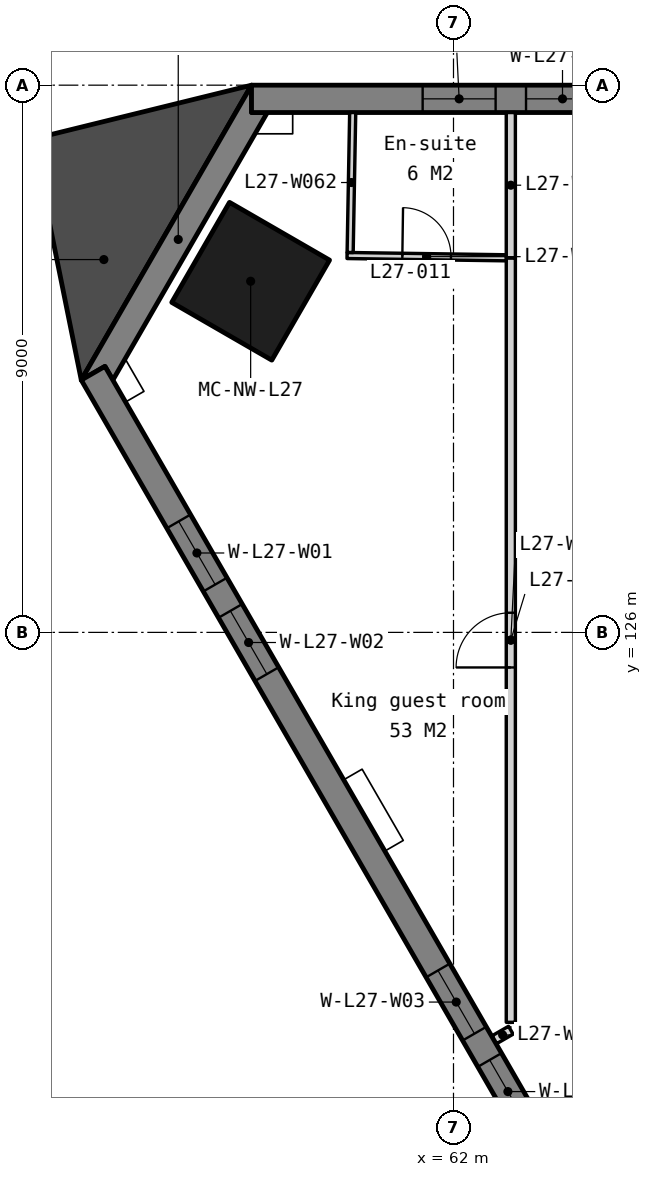
"""IFC4 building model, lengths in metres.
Left out: names, types, materials, properties, quantities, classifications, styles, units other than length and angle.
Written with IfcOpenShell. Run it as: python <this file> out.ifc"""

import sys

from ifc_helpers import new_model, si_unit, direction, frame, frame_2d, origin, origin_2d, place, context, subcontext, project, spatial, polyline, rectangle, outline, extrude, element, fill, save


model = new_model("IFC4")
c1 = context("Model", 3, precision=1e-05, world=origin(), true_north=direction((0.0, 1.0)))
c2 = subcontext(c1, "Body", "Model", "MODEL_VIEW")
j1 = project(units=[si_unit("LENGTHUNIT", "METRE"), si_unit("PLANEANGLEUNIT", "RADIAN")], contexts=[c1])
p1 = place(None, origin())
s1 = spatial("IfcSite", under=j1, at=p1, CompositionType="ELEMENT")
p2 = place(p1, origin())
s2 = spatial("IfcBuilding", under=s1, at=p2, CompositionType="ELEMENT")
p3 = place(p2, frame((0.0, 0.0, 109.8)))
s3 = spatial("IfcBuildingStorey", under=s2, at=p3, CompositionType="ELEMENT", Elevation=109.8)
p4 = place(p3, frame((58.664, 131.775, 0.0), z_axis=(0.0, 0.0, 1.0), x_axis=(-0.5, -0.866025403784, 0.0)))
e1 = element("IfcColumn", 1, at=p4, inside=s3, PredefinedType="COLUMN", context=c2, shape_type="SweptSolid", body=[
    extrude(rectangle(XDim=1.9, YDim=1.9, at=origin_2d()), origin(), (0.0, 0.0, 1.0), 3.5),
])
p5 = place(p3, frame((0.0, 0.0, -0.15)))
e2 = element("IfcWall", 2, at=p5, inside=s3, PredefinedType="SOLIDWALL", context=c2, shape_type="SweptSolid", body=[
    extrude(outline(polyline([(58.678, 135.0), (58.678, 134.55), (58.938, 134.55), (56.398, 130.15), (56.268, 130.375), (55.878, 130.15), (58.678, 135.0)])), origin(), (0.0, 0.0, 1.0), 3.5),
])
p6 = place(p3, frame((101.322, 134.775, -0.15), z_axis=(0.0, 0.0, 1.0), x_axis=(-1.0, 0.0, 0.0)))
e3 = element("IfcWall", 3, at=p6, inside=s3, PredefinedType="SOLIDWALL", context=c2, shape_type="SweptSolid", body=[
    extrude(outline(polyline([(42.643, 0.0), (42.643, 3.5), (0.0, 3.5), (0.0, 0.0), (42.643, 0.0)])), frame((0.0, 0.225, 0.0), z_axis=(0.0, -1.0, 0.0), x_axis=(1.0, 0.0, 0.0)), (0.0, 0.0, 1.0), 0.45),
])
p7 = place(p6, frame((2.814, 0.0, 1.05)))
e4 = element("IfcOpeningElement", 4, at=p7, cuts=e3, PredefinedType="OPENING", context=c2, shape_type="SweptSolid", body=[
    extrude(rectangle(XDim=1.2, YDim=1.5, at=frame_2d((0.6, 0.75))), frame((0.0, 0.235, 0.0), z_axis=(0.0, -1.0, 0.0), x_axis=(1.0, 0.0, 0.0)), (0.0, 0.0, 1.0), 0.47),
])
p8 = place(p6, frame((4.514, 0.0, 1.05)))
e5 = element("IfcOpeningElement", 5, at=p8, cuts=e3, PredefinedType="OPENING", context=c2, shape_type="SweptSolid", body=[
    extrude(rectangle(XDim=1.2, YDim=1.5, at=frame_2d((0.6, 0.75))), frame((0.0, 0.235, 0.0), z_axis=(0.0, -1.0, 0.0), x_axis=(1.0, 0.0, 0.0)), (0.0, 0.0, 1.0), 0.47),
])
p9 = place(p6, frame((11.343, 0.0, 1.05)))
e6 = element("IfcOpeningElement", 6, at=p9, cuts=e3, PredefinedType="OPENING", context=c2, shape_type="SweptSolid", body=[
    extrude(rectangle(XDim=1.2, YDim=1.5, at=frame_2d((0.6, 0.75))), frame((0.0, 0.235, 0.0), z_axis=(0.0, -1.0, 0.0), x_axis=(1.0, 0.0, 0.0)), (0.0, 0.0, 1.0), 0.47),
])
p10 = place(p6, frame((13.043, 0.0, 1.05)))
e7 = element("IfcOpeningElement", 7, at=p10, cuts=e3, PredefinedType="OPENING", context=c2, shape_type="SweptSolid", body=[
    extrude(rectangle(XDim=1.2, YDim=1.5, at=frame_2d((0.6, 0.75))), frame((0.0, 0.235, 0.0), z_axis=(0.0, -1.0, 0.0), x_axis=(1.0, 0.0, 0.0)), (0.0, 0.0, 1.0), 0.47),
])
p11 = place(p6, frame((19.872, 0.0, 1.05)))
e8 = element("IfcOpeningElement", 8, at=p11, cuts=e3, PredefinedType="OPENING", context=c2, shape_type="SweptSolid", body=[
    extrude(rectangle(XDim=1.2, YDim=1.5, at=frame_2d((0.6, 0.75))), frame((0.0, 0.235, 0.0), z_axis=(0.0, -1.0, 0.0), x_axis=(1.0, 0.0, 0.0)), (0.0, 0.0, 1.0), 0.47),
])
p12 = place(p6, frame((21.572, 0.0, 1.05)))
e9 = element("IfcOpeningElement", 9, at=p12, cuts=e3, PredefinedType="OPENING", context=c2, shape_type="SweptSolid", body=[
    extrude(rectangle(XDim=1.2, YDim=1.5, at=frame_2d((0.6, 0.75))), frame((0.0, 0.235, 0.0), z_axis=(0.0, -1.0, 0.0), x_axis=(1.0, 0.0, 0.0)), (0.0, 0.0, 1.0), 0.47),
])
p13 = place(p6, frame((28.4, 0.0, 1.05)))
e10 = element("IfcOpeningElement", 10, at=p13, cuts=e3, PredefinedType="OPENING", context=c2, shape_type="SweptSolid", body=[
    extrude(rectangle(XDim=1.2, YDim=1.5, at=frame_2d((0.6, 0.75))), frame((0.0, 0.235, 0.0), z_axis=(0.0, -1.0, 0.0), x_axis=(1.0, 0.0, 0.0)), (0.0, 0.0, 1.0), 0.47),
])
p14 = place(p6, frame((30.1, 0.0, 1.05)))
e11 = element("IfcOpeningElement", 11, at=p14, cuts=e3, PredefinedType="OPENING", context=c2, shape_type="SweptSolid", body=[
    extrude(rectangle(XDim=1.2, YDim=1.5, at=frame_2d((0.6, 0.75))), frame((0.0, 0.235, 0.0), z_axis=(0.0, -1.0, 0.0), x_axis=(1.0, 0.0, 0.0)), (0.0, 0.0, 1.0), 0.47),
])
p15 = place(p6, frame((36.929, 0.0, 1.05)))
e12 = element("IfcOpeningElement", 12, at=p15, cuts=e3, PredefinedType="OPENING", context=c2, shape_type="SweptSolid", body=[
    extrude(rectangle(XDim=1.2, YDim=1.5, at=frame_2d((0.6, 0.75))), frame((0.0, 0.235, 0.0), z_axis=(0.0, -1.0, 0.0), x_axis=(1.0, 0.0, 0.0)), (0.0, 0.0, 1.0), 0.47),
])
p16 = place(p6, frame((38.629, 0.0, 1.05)))
e13 = element("IfcOpeningElement", 13, at=p16, cuts=e3, PredefinedType="OPENING", context=c2, shape_type="SweptSolid", body=[
    extrude(rectangle(XDim=1.2, YDim=1.5, at=frame_2d((0.6, 0.75))), frame((0.0, 0.235, 0.0), z_axis=(0.0, -1.0, 0.0), x_axis=(1.0, 0.0, 0.0)), (0.0, 0.0, 1.0), 0.47),
])
p17 = place(p3, frame((56.073, 130.263, -0.15), z_axis=(0.0, 0.0, 1.0), x_axis=(0.500000478905, -0.866025127289, 0.0)))
e14 = element("IfcWall", 14, at=p17, inside=s3, PredefinedType="SOLIDWALL", context=c2, shape_type="SweptSolid", body=[
    extrude(outline(polyline([(42.643, 0.0), (42.643, 3.5), (0.0, 3.5), (0.0, 0.0), (42.643, 0.0)])), frame((0.0, 0.225, 0.0), z_axis=(0.0, -1.0, 0.0), x_axis=(1.0, 0.0, 0.0)), (0.0, 0.0, 1.0), 0.45),
])
p18 = place(p17, frame((2.814, 0.0, 1.05)))
e15 = element("IfcOpeningElement", 15, at=p18, cuts=e14, PredefinedType="OPENING", context=c2, shape_type="SweptSolid", body=[
    extrude(rectangle(XDim=1.2, YDim=1.5, at=frame_2d((0.6, 0.75))), frame((0.0, 0.235, 0.0), z_axis=(0.0, -1.0, 0.0), x_axis=(1.0, 0.0, 0.0)), (0.0, 0.0, 1.0), 0.47),
])
p19 = place(p17, frame((4.514, 0.0, 1.05)))
e16 = element("IfcOpeningElement", 16, at=p19, cuts=e14, PredefinedType="OPENING", context=c2, shape_type="SweptSolid", body=[
    extrude(rectangle(XDim=1.2, YDim=1.5, at=frame_2d((0.6, 0.75))), frame((0.0, 0.235, 0.0), z_axis=(0.0, -1.0, 0.0), x_axis=(1.0, 0.0, 0.0)), (0.0, 0.0, 1.0), 0.47),
])
p20 = place(p17, frame((11.343, 0.0, 1.05)))
e17 = element("IfcOpeningElement", 17, at=p20, cuts=e14, PredefinedType="OPENING", context=c2, shape_type="SweptSolid", body=[
    extrude(rectangle(XDim=1.2, YDim=1.5, at=frame_2d((0.6, 0.75))), frame((0.0, 0.235, 0.0), z_axis=(0.0, -1.0, 0.0), x_axis=(1.0, 0.0, 0.0)), (0.0, 0.0, 1.0), 0.47),
])
p21 = place(p17, frame((13.043, 0.0, 1.05)))
e18 = element("IfcOpeningElement", 18, at=p21, cuts=e14, PredefinedType="OPENING", context=c2, shape_type="SweptSolid", body=[
    extrude(rectangle(XDim=1.2, YDim=1.5, at=frame_2d((0.6, 0.75))), frame((0.0, 0.235, 0.0), z_axis=(0.0, -1.0, 0.0), x_axis=(1.0, 0.0, 0.0)), (0.0, 0.0, 1.0), 0.47),
])
p22 = place(p17, frame((19.872, 0.0, 1.05)))
e19 = element("IfcOpeningElement", 19, at=p22, cuts=e14, PredefinedType="OPENING", context=c2, shape_type="SweptSolid", body=[
    extrude(rectangle(XDim=1.2, YDim=1.5, at=frame_2d((0.6, 0.75))), frame((0.0, 0.235, 0.0), z_axis=(0.0, -1.0, 0.0), x_axis=(1.0, 0.0, 0.0)), (0.0, 0.0, 1.0), 0.47),
])
p23 = place(p17, frame((21.572, 0.0, 1.05)))
e20 = element("IfcOpeningElement", 20, at=p23, cuts=e14, PredefinedType="OPENING", context=c2, shape_type="SweptSolid", body=[
    extrude(rectangle(XDim=1.2, YDim=1.5, at=frame_2d((0.6, 0.75))), frame((0.0, 0.235, 0.0), z_axis=(0.0, -1.0, 0.0), x_axis=(1.0, 0.0, 0.0)), (0.0, 0.0, 1.0), 0.47),
])
p24 = place(p17, frame((28.4, 0.0, 1.05)))
e21 = element("IfcOpeningElement", 21, at=p24, cuts=e14, PredefinedType="OPENING", context=c2, shape_type="SweptSolid", body=[
    extrude(rectangle(XDim=1.2, YDim=1.5, at=frame_2d((0.6, 0.75))), frame((0.0, 0.235, 0.0), z_axis=(0.0, -1.0, 0.0), x_axis=(1.0, 0.0, 0.0)), (0.0, 0.0, 1.0), 0.47),
])
p25 = place(p17, frame((30.1, 0.0, 1.05)))
e22 = element("IfcOpeningElement", 22, at=p25, cuts=e14, PredefinedType="OPENING", context=c2, shape_type="SweptSolid", body=[
    extrude(rectangle(XDim=1.2, YDim=1.5, at=frame_2d((0.6, 0.75))), frame((0.0, 0.235, 0.0), z_axis=(0.0, -1.0, 0.0), x_axis=(1.0, 0.0, 0.0)), (0.0, 0.0, 1.0), 0.47),
])
p26 = place(p17, frame((36.929, 0.0, 1.05)))
e23 = element("IfcOpeningElement", 23, at=p26, cuts=e14, PredefinedType="OPENING", context=c2, shape_type="SweptSolid", body=[
    extrude(rectangle(XDim=1.2, YDim=1.5, at=frame_2d((0.6, 0.75))), frame((0.0, 0.235, 0.0), z_axis=(0.0, -1.0, 0.0), x_axis=(1.0, 0.0, 0.0)), (0.0, 0.0, 1.0), 0.47),
])
p27 = place(p17, frame((38.629, 0.0, 1.05)))
e24 = element("IfcOpeningElement", 24, at=p27, cuts=e14, PredefinedType="OPENING", context=c2, shape_type="SweptSolid", body=[
    extrude(rectangle(XDim=1.2, YDim=1.5, at=frame_2d((0.6, 0.75))), frame((0.0, 0.235, 0.0), z_axis=(0.0, -1.0, 0.0), x_axis=(1.0, 0.0, 0.0)), (0.0, 0.0, 1.0), 0.47),
])
p28 = place(p3, frame((0.0, 0.0, -0.15)))
e25 = element("IfcWall", 25, at=p28, inside=s3, PredefinedType="SOLIDWALL", context=c2, shape_type="SweptSolid", body=[
    extrude(outline(polyline([(58.678, 135.0), (55.077, 134.113), (55.878, 130.15), (58.678, 135.0)])), origin(), (0.0, 0.0, 1.0), 3.5),
])
p29 = place(p3, frame((62.673, 119.301, 0.0), z_axis=(0.0, 0.0, 1.0), x_axis=(0.866159461733, 0.499767732902, 0.0)))
e26 = element("IfcWall", 26, at=p29, inside=s3, PredefinedType="PARTITIONING", context=c2, shape_type="SweptSolid", body=[
    extrude(rectangle(XDim=0.311, YDim=0.15, at=frame_2d((0.156, 0.0))), origin(), (0.0, 0.0, 1.0), 3.35),
])
p30 = place(p3, frame((62.943, 119.587, 0.0), z_axis=(0.0, 0.0, 1.0), x_axis=(0.0, 1.0, 0.0)))
e27 = element("IfcWall", 27, at=p30, inside=s3, PredefinedType="PARTITIONING", context=c2, shape_type="SweptSolid", body=[
    extrude(rectangle(XDim=12.573, YDim=0.15, at=frame_2d((6.287, 0.0))), origin(), (0.0, 0.0, 1.0), 3.35),
])
p31 = place(p30, frame((5.836, 0.0, 0.0)))
e28 = element("IfcOpeningElement", 28, at=p31, cuts=e27, PredefinedType="OPENING", context=c2, shape_type="SweptSolid", body=[
    extrude(rectangle(XDim=0.9, YDim=2.1, at=frame_2d((0.45, 1.05))), frame((0.0, 0.085, 0.0), z_axis=(0.0, -1.0, 0.0), x_axis=(1.0, 0.0, 0.0)), (0.0, 0.0, 1.0), 0.17),
])
p32 = place(p3, frame((60.25, 132.198, 0.0), z_axis=(0.0, 0.0, 1.0), x_axis=(0.999895563634, -0.014452052626, 0.0)))
e29 = element("IfcWall", 29, at=p32, inside=s3, PredefinedType="PARTITIONING", context=c2, shape_type="SweptSolid", body=[
    extrude(rectangle(XDim=2.618, YDim=0.1, at=frame_2d((1.309, 0.0))), origin(), (0.0, 0.0, 1.0), 3.35),
])
p33 = place(p32, frame((0.909, 0.0, 0.0)))
e30 = element("IfcOpeningElement", 30, at=p33, cuts=e29, PredefinedType="OPENING", context=c2, shape_type="SweptSolid", body=[
    extrude(rectangle(XDim=0.8, YDim=2.1, at=frame_2d((0.4, 1.05))), frame((0.0, 0.06, 0.0), z_axis=(0.0, -1.0, 0.0), x_axis=(1.0, 0.0, 0.0)), (0.0, 0.0, 1.0), 0.12),
])
p34 = place(p3, frame((60.3, 132.248, 0.0), z_axis=(0.0, 0.0, 1.0), x_axis=(0.018236627382, 0.999833698883, 0.0)))
e31 = element("IfcWall", 31, at=p34, inside=s3, PredefinedType="PARTITIONING", context=c2, shape_type="SweptSolid", body=[
    extrude(rectangle(XDim=2.303, YDim=0.1, at=frame_2d((1.151, 0.0))), origin(), (0.0, 0.0, 1.0), 3.35),
])
p35 = place(p3, frame((62.943, 132.16, 0.0), z_axis=(0.0, 0.0, 1.0), x_axis=(0.0, 1.0, 0.0)))
e32 = element("IfcWall", 32, at=p35, inside=s3, PredefinedType="PARTITIONING", context=c2, shape_type="SweptSolid", body=[
    extrude(rectangle(XDim=2.39, YDim=0.15, at=frame_2d((1.195, 0.0))), origin(), (0.0, 0.0, 1.0), 3.35),
])
p36 = place(p15, origin())
e33 = element("IfcWindow", 33, at=p36, inside=s3, PartitioningType="SINGLE_PANEL", PredefinedType="WINDOW", context=c2, shape_type="SweptSolid", body=[
    extrude(rectangle(XDim=1.2, YDim=1.5, at=frame_2d((0.6, 0.75))), frame((0.0, 0.03, 0.0), z_axis=(0.0, -1.0, 0.0), x_axis=(1.0, 0.0, 0.0)), (0.0, 0.0, 1.0), 0.06),
])
fill(e12, e33)
p37 = place(p16, origin())
e34 = element("IfcWindow", 34, at=p37, inside=s3, PartitioningType="SINGLE_PANEL", PredefinedType="WINDOW", context=c2, shape_type="SweptSolid", body=[
    extrude(rectangle(XDim=1.2, YDim=1.5, at=frame_2d((0.6, 0.75))), frame((0.0, 0.03, 0.0), z_axis=(0.0, -1.0, 0.0), x_axis=(1.0, 0.0, 0.0)), (0.0, 0.0, 1.0), 0.06),
])
fill(e13, e34)
p38 = place(p18, origin())
e35 = element("IfcWindow", 35, at=p38, inside=s3, PartitioningType="SINGLE_PANEL", PredefinedType="WINDOW", context=c2, shape_type="SweptSolid", body=[
    extrude(rectangle(XDim=1.2, YDim=1.5, at=frame_2d((0.6, 0.75))), frame((0.0, 0.03, 0.0), z_axis=(0.0, -1.0, 0.0), x_axis=(1.0, 0.0, 0.0)), (0.0, 0.0, 1.0), 0.06),
])
fill(e15, e35)
p39 = place(p19, origin())
e36 = element("IfcWindow", 36, at=p39, inside=s3, PartitioningType="SINGLE_PANEL", PredefinedType="WINDOW", context=c2, shape_type="SweptSolid", body=[
    extrude(rectangle(XDim=1.2, YDim=1.5, at=frame_2d((0.6, 0.75))), frame((0.0, 0.03, 0.0), z_axis=(0.0, -1.0, 0.0), x_axis=(1.0, 0.0, 0.0)), (0.0, 0.0, 1.0), 0.06),
])
fill(e16, e36)
p40 = place(p20, origin())
e37 = element("IfcWindow", 37, at=p40, inside=s3, PartitioningType="SINGLE_PANEL", PredefinedType="WINDOW", context=c2, shape_type="SweptSolid", body=[
    extrude(rectangle(XDim=1.2, YDim=1.5, at=frame_2d((0.6, 0.75))), frame((0.0, 0.03, 0.0), z_axis=(0.0, -1.0, 0.0), x_axis=(1.0, 0.0, 0.0)), (0.0, 0.0, 1.0), 0.06),
])
fill(e17, e37)
p41 = place(p21, origin())
e38 = element("IfcWindow", 38, at=p41, inside=s3, PartitioningType="SINGLE_PANEL", PredefinedType="WINDOW", context=c2, shape_type="SweptSolid", body=[
    extrude(rectangle(XDim=1.2, YDim=1.5, at=frame_2d((0.6, 0.75))), frame((0.0, 0.03, 0.0), z_axis=(0.0, -1.0, 0.0), x_axis=(1.0, 0.0, 0.0)), (0.0, 0.0, 1.0), 0.06),
])
fill(e18, e38)
p42 = place(p31, origin())
e39 = element("IfcDoor", 39, at=p42, inside=s3, OperationType="SINGLE_SWING_LEFT", PredefinedType="DOOR", context=c2, shape_type="SweptSolid", body=[
    extrude(rectangle(XDim=0.9, YDim=2.1, at=frame_2d((0.45, 1.05))), frame((0.0, 0.025, 0.0), z_axis=(0.0, -1.0, 0.0), x_axis=(1.0, 0.0, 0.0)), (0.0, 0.0, 1.0), 0.05),
])
fill(e28, e39)
p43 = place(p33, origin())
e40 = element("IfcDoor", 40, at=p43, inside=s3, OperationType="SINGLE_SWING_LEFT", PredefinedType="DOOR", context=c2, shape_type="SweptSolid", body=[
    extrude(rectangle(XDim=0.8, YDim=2.1, at=frame_2d((0.4, 1.05))), frame((0.0, 0.025, 0.0), z_axis=(0.0, -1.0, 0.0), x_axis=(1.0, 0.0, 0.0)), (0.0, 0.0, 1.0), 0.05),
])
fill(e30, e40)
save(model, sys.argv[1])
